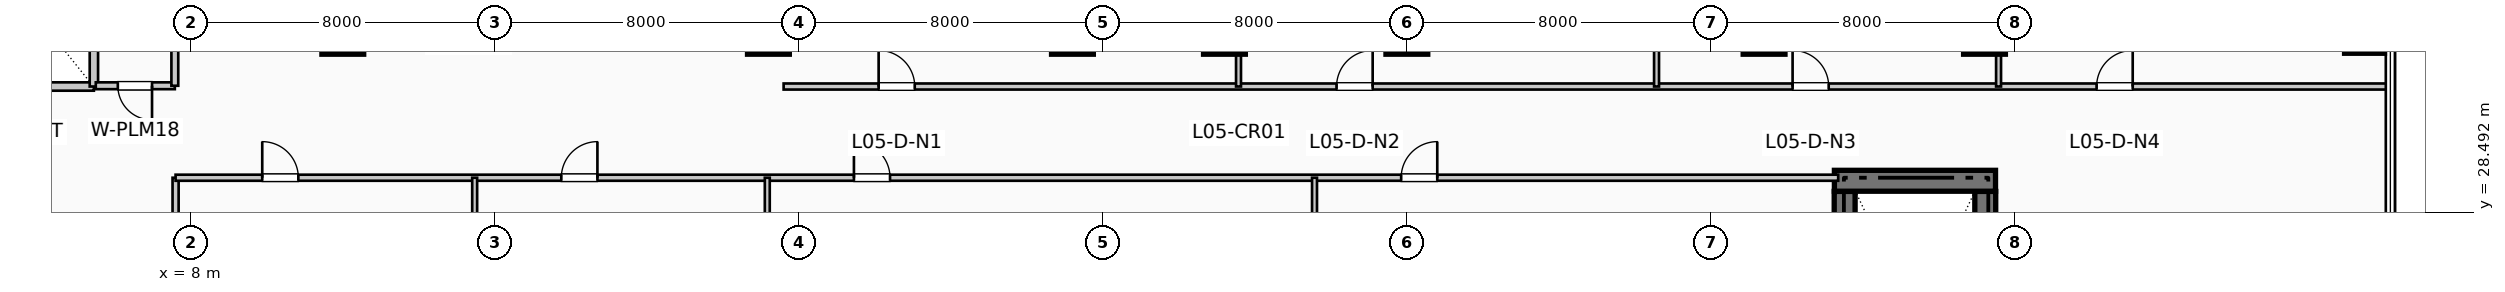
"""IFC4 building model, lengths in metres.
Left out: names, types, materials, properties, quantities, classifications, styles, units other than length and angle.
Written with IfcOpenShell. Run it as: python <this file> out.ifc"""

import sys

from ifc_helpers import new_model, si_unit, direction, frame, frame_2d, origin, origin_2d, place, context, subcontext, project, spatial, rectangle, extrude, element, fill, save


model = new_model("IFC4")
c1 = context("Model", 3, precision=1e-05, world=origin(), true_north=direction((0.0, 1.0)))
c2 = subcontext(c1, "Body", "Model", "MODEL_VIEW")
j1 = project(units=[si_unit("LENGTHUNIT", "METRE"), si_unit("PLANEANGLEUNIT", "RADIAN")], contexts=[c1])
p1 = place(None, origin())
s1 = spatial("IfcSite", under=j1, at=p1, CompositionType="ELEMENT")
p2 = place(p1, origin())
s2 = spatial("IfcBuilding", under=s1, at=p2, CompositionType="ELEMENT")
p3 = place(p2, frame((0.0, 0.0, 25.74)))
s3 = spatial("IfcBuildingStorey", under=s2, at=p3, CompositionType="ELEMENT", Elevation=25.74)
for number, where, z_axis, x_axis in (
    (1, (51.52, 21.15, 0.0), (0.0, 0.0, 1.0), (0.0, 1.0, 0.0)),
    (2, (55.22, 21.15, 0.0), (0.0, 0.0, 1.0), (0.0, 1.0, 0.0)),
):
    element("IfcWall", number, at=place(p3, frame(where, z_axis=z_axis, x_axis=x_axis)), inside=s3, PredefinedType="SHEAR", context=c2, shape_type="SweptSolid", body=[
        extrude(rectangle(XDim=7.89, YDim=0.55, at=frame_2d((3.945, 0.0))), origin(), (0.0, 0.0, 1.0), 4.62),
    ])
p4 = place(p3, frame((51.25, 29.32, 0.0), z_axis=(0.0, 0.0, 1.0), x_axis=(1.0, 0.0, 0.0)))
e3 = element("IfcWall", 3, at=p4, inside=s3, PredefinedType="SHEAR", context=c2, shape_type="SweptSolid", body=[
    extrude(rectangle(XDim=4.24, YDim=0.55, at=frame_2d((2.12, 0.0))), origin(), (0.0, 0.0, 1.0), 4.62),
])
for number, where, z_axis, x_axis in (
    (4, (12.0, 33.2, 0.0), (0.0, 0.0, 1.0), (1.0, 0.0, 0.0)),
    (5, (23.2, 33.2, 0.0), (0.0, 0.0, 1.0), (1.0, 0.0, 0.0)),
    (6, (31.2, 33.2, 0.0), (0.0, 0.0, 1.0), (1.0, 0.0, 0.0)),
    (7, (35.2, 33.2, 0.0), (0.0, 0.0, 1.0), (1.0, 0.0, 0.0)),
    (8, (40.0, 33.2, 0.0), (0.0, 0.0, 1.0), (1.0, 0.0, 0.0)),
    (9, (49.4, 33.2, 0.0), (0.0, 0.0, 1.0), (1.0, 0.0, 0.0)),
    (10, (55.2, 33.2, 0.0), (0.0, 0.0, 1.0), (1.0, 0.0, 0.0)),
):
    element("IfcColumn", number, at=place(p3, frame(where, z_axis=z_axis, x_axis=x_axis)), inside=s3, PredefinedType="COLUMN", context=c2, shape_type="SweptSolid", body=[
        extrude(rectangle(XDim=1.1, YDim=1.1, at=origin_2d()), origin(), (0.0, 0.0, 1.0), 4.62),
    ])
p5 = place(p3, frame((65.2, 33.2, 0.0), z_axis=(0.0, 0.0, 1.0), x_axis=(1.0, 0.0, 0.0)))
e11 = element("IfcColumn", 11, at=p5, inside=s3, PredefinedType="COLUMN", context=c2, shape_type="SweptSolid", body=[
    extrude(rectangle(XDim=1.05, YDim=1.05, at=origin_2d()), origin(), (0.0, 0.0, 1.0), 4.62),
])
p6 = place(p3, frame((1.55, 31.8, 0.0), z_axis=(0.0, 0.0, 1.0), x_axis=(1.0, 0.0, 0.0)))
e12 = element("IfcWall", 12, at=p6, inside=s3, PredefinedType="PARTITIONING", context=c2, shape_type="SweptSolid", body=[
    extrude(rectangle(XDim=3.9, YDim=0.22, at=frame_2d((1.95, 0.0))), origin(), (0.0, 0.0, 1.0), 4.37),
])
p7 = place(p3, frame((5.45, 31.8, 0.0), z_axis=(0.0, 0.0, 1.0), x_axis=(0.0, 1.0, 0.0)))
e13 = element("IfcWall", 13, at=p7, inside=s3, PredefinedType="PARTITIONING", context=c2, shape_type="SweptSolid", body=[
    extrude(rectangle(XDim=2.38, YDim=0.22, at=frame_2d((1.19, 0.0))), origin(), (0.0, 0.0, 1.0), 4.37),
])
p8 = place(p3, frame((5.5, 31.82, 0.0), z_axis=(0.0, 0.0, 1.0), x_axis=(1.0, 0.0, 0.0)))
e14 = element("IfcWall", 14, at=p8, inside=s3, PredefinedType="PLUMBINGWALL", context=c2, shape_type="SweptSolid", body=[
    extrude(rectangle(XDim=2.08, YDim=0.18, at=frame_2d((1.04, 0.0))), origin(), (0.0, 0.0, 1.0), 4.37),
])
p9 = place(p8, frame((1.48, 0.0, 0.0), z_axis=(0.0, 0.0, 1.0), x_axis=(-1.0, 0.0, 0.0)))
e15 = element("IfcOpeningElement", 15, at=p9, cuts=e14, PredefinedType="OPENING", context=c2, shape_type="SweptSolid", body=[
    extrude(rectangle(XDim=0.9, YDim=2.1, at=frame_2d((0.45, 1.05))), frame((0.0, 0.1, 0.0), z_axis=(0.0, -1.0, 0.0), x_axis=(1.0, 0.0, 0.0)), (0.0, 0.0, 1.0), 0.2),
])
p10 = place(p3, frame((7.58, 31.82, 0.0), z_axis=(0.0, 0.0, 1.0), x_axis=(0.0, 1.0, 0.0)))
e16 = element("IfcWall", 16, at=p10, inside=s3, PredefinedType="PLUMBINGWALL", context=c2, shape_type="SweptSolid", body=[
    extrude(rectangle(XDim=2.36, YDim=0.18, at=frame_2d((1.18, 0.0))), origin(), (0.0, 0.0, 1.0), 4.37),
])
p11 = place(p3, frame((7.6, -1.81, 0.0), z_axis=(0.0, 0.0, 1.0), x_axis=(0.0, 1.0, 0.0)))
e17 = element("IfcWall", 17, at=p11, inside=s3, PredefinedType="PARTITIONING", context=c2, shape_type="SweptSolid", body=[
    extrude(rectangle(XDim=31.21, YDim=0.16, at=frame_2d((15.605, 0.0))), origin(), (0.0, 0.0, 1.0), 4.37),
])
p12 = place(p3, frame((7.6, 29.4, 0.0), z_axis=(0.0, 0.0, 1.0), x_axis=(1.0, 0.0, 0.0)))
e18 = element("IfcWall", 18, at=p12, inside=s3, PredefinedType="PARTITIONING", context=c2, shape_type="SweptSolid", body=[
    extrude(rectangle(XDim=43.75, YDim=0.16, at=frame_2d((21.875, 0.0))), origin(), (0.0, 0.0, 1.0), 4.025),
])
p13 = place(p12, frame((2.28, 0.0, 0.0)))
e19 = element("IfcOpeningElement", 19, at=p13, cuts=e18, PredefinedType="OPENING", context=c2, shape_type="SweptSolid", body=[
    extrude(rectangle(XDim=0.95, YDim=2.15, at=frame_2d((0.475, 1.075))), frame((0.0, 0.09, 0.0), z_axis=(0.0, -1.0, 0.0), x_axis=(1.0, 0.0, 0.0)), (0.0, 0.0, 1.0), 0.18),
])
p14 = place(p12, frame((10.15, 0.0, 0.0)))
e20 = element("IfcOpeningElement", 20, at=p14, cuts=e18, PredefinedType="OPENING", context=c2, shape_type="SweptSolid", body=[
    extrude(rectangle(XDim=0.95, YDim=2.15, at=frame_2d((0.475, 1.075))), frame((0.0, 0.09, 0.0), z_axis=(0.0, -1.0, 0.0), x_axis=(1.0, 0.0, 0.0)), (0.0, 0.0, 1.0), 0.18),
])
p15 = place(p12, frame((17.85, 0.0, 0.0)))
e21 = element("IfcOpeningElement", 21, at=p15, cuts=e18, PredefinedType="OPENING", context=c2, shape_type="SweptSolid", body=[
    extrude(rectangle(XDim=0.95, YDim=2.15, at=frame_2d((0.475, 1.075))), frame((0.0, 0.09, 0.0), z_axis=(0.0, -1.0, 0.0), x_axis=(1.0, 0.0, 0.0)), (0.0, 0.0, 1.0), 0.18),
])
p16 = place(p12, frame((32.25, 0.0, 0.0)))
e22 = element("IfcOpeningElement", 22, at=p16, cuts=e18, PredefinedType="OPENING", context=c2, shape_type="SweptSolid", body=[
    extrude(rectangle(XDim=0.95, YDim=2.15, at=frame_2d((0.475, 1.075))), frame((0.0, 0.09, 0.0), z_axis=(0.0, -1.0, 0.0), x_axis=(1.0, 0.0, 0.0)), (0.0, 0.0, 1.0), 0.18),
])
p17 = place(p3, frame((15.47, -1.81, 0.0), z_axis=(0.0, 0.0, 1.0), x_axis=(0.0, 1.0, 0.0)))
e23 = element("IfcWall", 23, at=p17, inside=s3, PredefinedType="PARTITIONING", context=c2, shape_type="SweptSolid", body=[
    extrude(rectangle(XDim=31.21, YDim=0.13, at=frame_2d((15.605, 0.0))), origin(), (0.0, 0.0, 1.0), 4.37),
])
p18 = place(p3, frame((23.17, 16.19, 0.0), z_axis=(0.0, 0.0, 1.0), x_axis=(0.0, 1.0, 0.0)))
e24 = element("IfcWall", 24, at=p18, inside=s3, PredefinedType="PARTITIONING", context=c2, shape_type="SweptSolid", body=[
    extrude(rectangle(XDim=13.21, YDim=0.13, at=frame_2d((6.605, 0.0))), origin(), (0.0, 0.0, 1.0), 3.555),
])
p19 = place(p3, frame((37.57, 16.19, 0.0), z_axis=(0.0, 0.0, 1.0), x_axis=(0.0, 1.0, 0.0)))
e25 = element("IfcWall", 25, at=p19, inside=s3, PredefinedType="PARTITIONING", context=c2, shape_type="SweptSolid", body=[
    extrude(rectangle(XDim=13.21, YDim=0.13, at=frame_2d((6.605, 0.0))), origin(), (0.0, 0.0, 1.0), 4.37),
])
p20 = place(p3, frame((23.6, 31.8, 0.0), z_axis=(0.0, 0.0, 1.0), x_axis=(1.0, 0.0, 0.0)))
e26 = element("IfcWall", 26, at=p20, inside=s3, PredefinedType="PARTITIONING", context=c2, shape_type="SweptSolid", body=[
    extrude(rectangle(XDim=42.21, YDim=0.16, at=frame_2d((21.105, 0.0))), origin(), (0.0, 0.0, 1.0), 4.37),
])
p21 = place(p20, frame((2.5, 0.0, 0.0)))
e27 = element("IfcOpeningElement", 27, at=p21, cuts=e26, PredefinedType="OPENING", context=c2, shape_type="SweptSolid", body=[
    extrude(rectangle(XDim=0.95, YDim=2.15, at=frame_2d((0.475, 1.075))), frame((0.0, 0.09, 0.0), z_axis=(0.0, -1.0, 0.0), x_axis=(1.0, 0.0, 0.0)), (0.0, 0.0, 1.0), 0.18),
])
p22 = place(p20, frame((14.55, 0.0, 0.0)))
e28 = element("IfcOpeningElement", 28, at=p22, cuts=e26, PredefinedType="OPENING", context=c2, shape_type="SweptSolid", body=[
    extrude(rectangle(XDim=0.95, YDim=2.15, at=frame_2d((0.475, 1.075))), frame((0.0, 0.09, 0.0), z_axis=(0.0, -1.0, 0.0), x_axis=(1.0, 0.0, 0.0)), (0.0, 0.0, 1.0), 0.18),
])
p23 = place(p20, frame((26.55, 0.0, 0.0)))
e29 = element("IfcOpeningElement", 29, at=p23, cuts=e26, PredefinedType="OPENING", context=c2, shape_type="SweptSolid", body=[
    extrude(rectangle(XDim=0.95, YDim=2.15, at=frame_2d((0.475, 1.075))), frame((0.0, 0.09, 0.0), z_axis=(0.0, -1.0, 0.0), x_axis=(1.0, 0.0, 0.0)), (0.0, 0.0, 1.0), 0.18),
])
p24 = place(p20, frame((34.55, 0.0, 0.0)))
e30 = element("IfcOpeningElement", 30, at=p24, cuts=e26, PredefinedType="OPENING", context=c2, shape_type="SweptSolid", body=[
    extrude(rectangle(XDim=0.95, YDim=2.15, at=frame_2d((0.475, 1.075))), frame((0.0, 0.09, 0.0), z_axis=(0.0, -1.0, 0.0), x_axis=(1.0, 0.0, 0.0)), (0.0, 0.0, 1.0), 0.18),
])
p25 = place(p3, frame((35.57, 31.8, 0.0), z_axis=(0.0, 0.0, 1.0), x_axis=(0.0, 1.0, 0.0)))
e31 = element("IfcWall", 31, at=p25, inside=s3, PredefinedType="PARTITIONING", context=c2, shape_type="SweptSolid", body=[
    extrude(rectangle(XDim=16.01, YDim=0.13, at=frame_2d((8.005, 0.0))), origin(), (0.0, 0.0, 1.0), 3.555),
])
p26 = place(p3, frame((46.57, 31.8, 0.0), z_axis=(0.0, 0.0, 1.0), x_axis=(0.0, 1.0, 0.0)))
e32 = element("IfcWall", 32, at=p26, inside=s3, PredefinedType="PARTITIONING", context=c2, shape_type="SweptSolid", body=[
    extrude(rectangle(XDim=16.01, YDim=0.13, at=frame_2d((8.005, 0.0))), origin(), (0.0, 0.0, 1.0), 4.37),
])
p27 = place(p3, frame((55.57, 31.8, 0.0), z_axis=(0.0, 0.0, 1.0), x_axis=(0.0, 1.0, 0.0)))
e33 = element("IfcWall", 33, at=p27, inside=s3, PredefinedType="PARTITIONING", context=c2, shape_type="SweptSolid", body=[
    extrude(rectangle(XDim=16.01, YDim=0.13, at=frame_2d((8.005, 0.0))), origin(), (0.0, 0.0, 1.0), 3.555),
])
p28 = place(p9, origin())
e34 = element("IfcDoor", 34, at=p28, inside=s3, OperationType="SINGLE_SWING_RIGHT", PredefinedType="DOOR", context=c2, shape_type="SweptSolid", body=[
    extrude(rectangle(XDim=0.9, YDim=2.1, at=frame_2d((0.45, 1.05))), frame((0.0, 0.025, 0.0), z_axis=(0.0, -1.0, 0.0), x_axis=(1.0, 0.0, 0.0)), (0.0, 0.0, 1.0), 0.05),
])
fill(e15, e34)
p29 = place(p13, origin())
e35 = element("IfcDoor", 35, at=p29, inside=s3, OperationType="SINGLE_SWING_LEFT", PredefinedType="DOOR", context=c2, shape_type="SweptSolid", body=[
    extrude(rectangle(XDim=0.95, YDim=2.15, at=frame_2d((0.475, 1.075))), frame((0.0, 0.025, 0.0), z_axis=(0.0, -1.0, 0.0), x_axis=(1.0, 0.0, 0.0)), (0.0, 0.0, 1.0), 0.05),
])
fill(e19, e35)
p30 = place(p14, origin())
e36 = element("IfcDoor", 36, at=p30, inside=s3, OperationType="SINGLE_SWING_RIGHT", PredefinedType="DOOR", context=c2, shape_type="SweptSolid", body=[
    extrude(rectangle(XDim=0.95, YDim=2.15, at=frame_2d((0.475, 1.075))), frame((0.0, 0.025, 0.0), z_axis=(0.0, -1.0, 0.0), x_axis=(1.0, 0.0, 0.0)), (0.0, 0.0, 1.0), 0.05),
])
fill(e20, e36)
p31 = place(p15, origin())
e37 = element("IfcDoor", 37, at=p31, inside=s3, OperationType="SINGLE_SWING_LEFT", PredefinedType="DOOR", context=c2, shape_type="SweptSolid", body=[
    extrude(rectangle(XDim=0.95, YDim=2.15, at=frame_2d((0.475, 1.075))), frame((0.0, 0.025, 0.0), z_axis=(0.0, -1.0, 0.0), x_axis=(1.0, 0.0, 0.0)), (0.0, 0.0, 1.0), 0.05),
])
fill(e21, e37)
p32 = place(p16, origin())
e38 = element("IfcDoor", 38, at=p32, inside=s3, OperationType="SINGLE_SWING_RIGHT", PredefinedType="DOOR", context=c2, shape_type="SweptSolid", body=[
    extrude(rectangle(XDim=0.95, YDim=2.15, at=frame_2d((0.475, 1.075))), frame((0.0, 0.025, 0.0), z_axis=(0.0, -1.0, 0.0), x_axis=(1.0, 0.0, 0.0)), (0.0, 0.0, 1.0), 0.05),
])
fill(e22, e38)
p33 = place(p21, origin())
e39 = element("IfcDoor", 39, at=p33, inside=s3, OperationType="SINGLE_SWING_LEFT", PredefinedType="DOOR", context=c2, shape_type="SweptSolid", body=[
    extrude(rectangle(XDim=0.95, YDim=2.15, at=frame_2d((0.475, 1.075))), frame((0.0, 0.025, 0.0), z_axis=(0.0, -1.0, 0.0), x_axis=(1.0, 0.0, 0.0)), (0.0, 0.0, 1.0), 0.05),
])
fill(e27, e39)
p34 = place(p22, origin())
e40 = element("IfcDoor", 40, at=p34, inside=s3, OperationType="SINGLE_SWING_RIGHT", PredefinedType="DOOR", context=c2, shape_type="SweptSolid", body=[
    extrude(rectangle(XDim=0.95, YDim=2.15, at=frame_2d((0.475, 1.075))), frame((0.0, 0.025, 0.0), z_axis=(0.0, -1.0, 0.0), x_axis=(1.0, 0.0, 0.0)), (0.0, 0.0, 1.0), 0.05),
])
fill(e28, e40)
p35 = place(p23, origin())
e41 = element("IfcDoor", 41, at=p35, inside=s3, OperationType="SINGLE_SWING_LEFT", PredefinedType="DOOR", context=c2, shape_type="SweptSolid", body=[
    extrude(rectangle(XDim=0.95, YDim=2.15, at=frame_2d((0.475, 1.075))), frame((0.0, 0.025, 0.0), z_axis=(0.0, -1.0, 0.0), x_axis=(1.0, 0.0, 0.0)), (0.0, 0.0, 1.0), 0.05),
])
fill(e29, e41)
p36 = place(p24, origin())
e42 = element("IfcDoor", 42, at=p36, inside=s3, OperationType="SINGLE_SWING_RIGHT", PredefinedType="DOOR", context=c2, shape_type="SweptSolid", body=[
    extrude(rectangle(XDim=0.95, YDim=2.15, at=frame_2d((0.475, 1.075))), frame((0.0, 0.025, 0.0), z_axis=(0.0, -1.0, 0.0), x_axis=(1.0, 0.0, 0.0)), (0.0, 0.0, 1.0), 0.05),
])
fill(e30, e42)
save(model, sys.argv[1])
